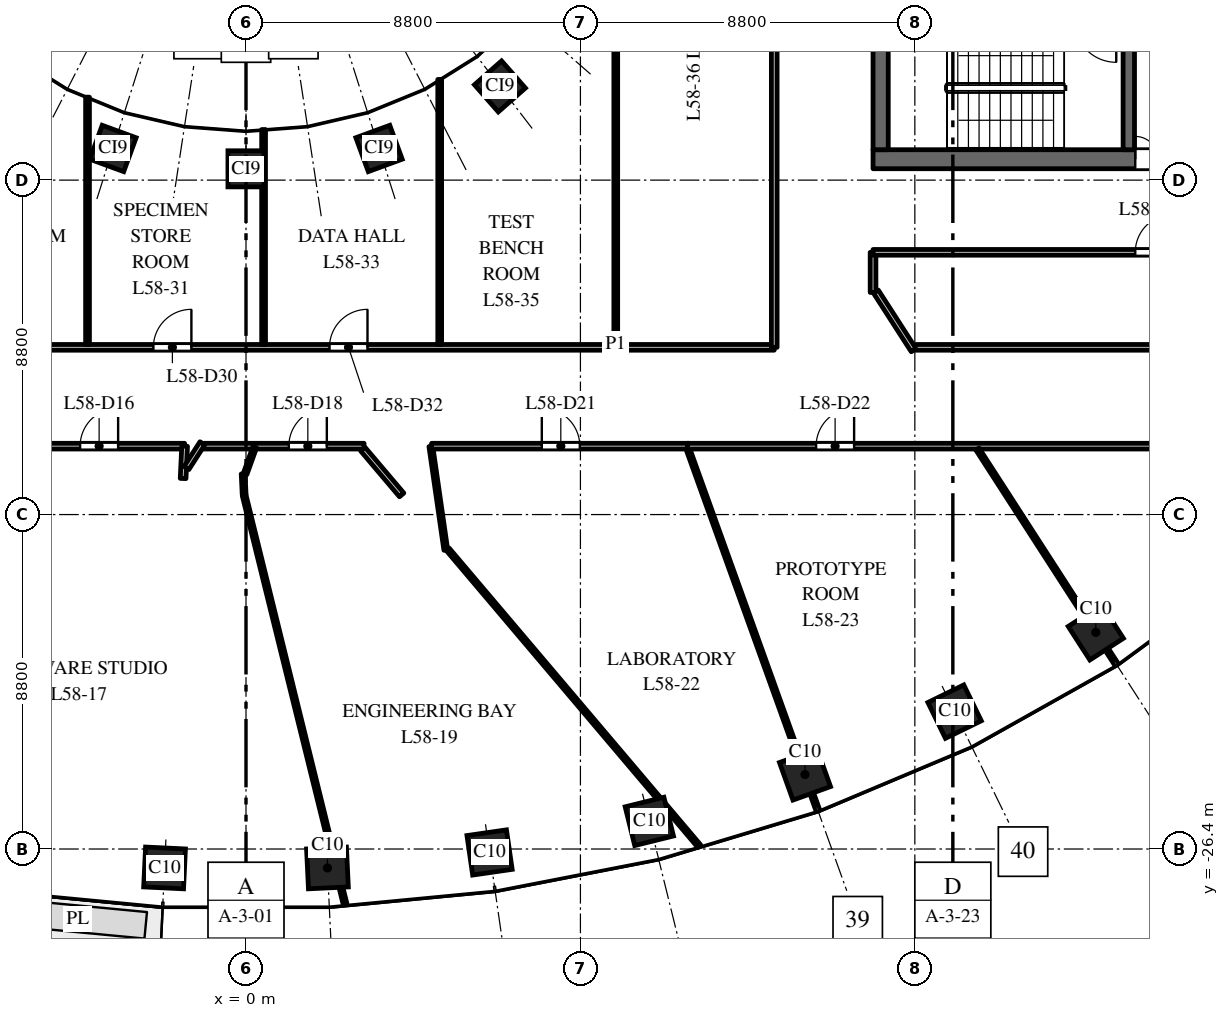
"""IFC4 building model, lengths in metres.
Left out: names, types, materials, properties, quantities, classifications, styles, units other than length and angle.
Written with IfcOpenShell. Run it as: python <this file> out.ifc"""

import sys

from ifc_helpers import new_model, si_unit, direction, frame, frame_2d, origin, origin_2d, place, context, subcontext, project, spatial, rectangle, extrude, element, fill, save


model = new_model("IFC4")
c1 = context("Model", 3, precision=1e-05, world=origin(), true_north=direction((0.0, 1.0)))
c2 = subcontext(c1, "Body", "Model", "MODEL_VIEW")
j1 = project(units=[si_unit("LENGTHUNIT", "METRE"), si_unit("PLANEANGLEUNIT", "RADIAN")], contexts=[c1])
p1 = place(None, origin())
s1 = spatial("IfcSite", under=j1, at=p1, CompositionType="ELEMENT")
p2 = place(p1, origin())
s2 = spatial("IfcBuilding", under=s1, at=p2, CompositionType="ELEMENT")
p3 = place(p2, frame((0.0, 0.0, 273.5)))
s3 = spatial("IfcBuildingStorey", under=s2, at=p3, CompositionType="ELEMENT", Elevation=273.5)
for number, where, z_axis, x_axis in (
    (1, (-2.143, -26.898, 0.0), (0.0, 0.0, 1.0), (0.999, -0.048, 0.0)),
    (2, (2.143, -26.898, 0.0), (0.0, 0.0, 1.0), (0.999, 0.048, 0.0)),
    (3, (6.409, -26.491, 0.0), (0.0, 0.0, 1.0), (0.99, 0.143, 0.0)),
    (4, (10.613, -25.674, 0.0), (0.0, 0.0, 1.0), (0.971, 0.24, 0.0)),
    (5, (14.709, -24.441, 0.0), (0.0, 0.0, 1.0), (0.941, 0.338, 0.0)),
    (6, (18.646, -22.785, 0.0), (0.0, 0.0, 1.0), (0.898, 0.439, 0.0)),
    (7, (22.362, -20.7, 0.0), (0.0, 0.0, 1.0), (0.84, 0.542, 0.0)),
):
    element("IfcColumn", number, at=place(p3, frame(where, z_axis=z_axis, x_axis=x_axis)), inside=s3, PredefinedType="COLUMN", context=c2, shape_type="SweptSolid", body=[
        extrude(rectangle(XDim=1.05, YDim=1.05, at=origin_2d()), origin(), (0.0, 0.0, 1.0), 4.0),
    ])
for number, where, z_axis, x_axis in (
    (8, (-3.501, -7.967, 0.0), (0.0, 0.0, 1.0), (0.939, -0.344, 0.0)),
    (9, (0.0, -8.503, 0.0), (0.0, 0.0, 1.0), (1.0, 0.0, 0.0)),
    (10, (3.501, -7.967, 0.0), (0.0, 0.0, 1.0), (0.939, 0.344, 0.0)),
    (11, (6.682, -6.334, 0.0), (0.0, 0.0, 1.0), (0.751, 0.66, 0.0)),
):
    element("IfcColumn", number, at=place(p3, frame(where, z_axis=z_axis, x_axis=x_axis)), inside=s3, PredefinedType="COLUMN", context=c2, shape_type="SweptSolid", body=[
        extrude(rectangle(XDim=0.95, YDim=0.95, at=origin_2d()), origin(), (0.0, 0.0, 1.0), 4.0),
    ])
p4 = place(p3, frame((16.5, -8.25, 0.0), z_axis=(0.0, 0.0, 1.0), x_axis=(1.0, 0.0, 0.0)))
e12 = element("IfcWall", 12, at=p4, inside=s3, PredefinedType="SHEAR", context=c2, shape_type="SweptSolid", body=[
    extrude(rectangle(XDim=15.0, YDim=0.5, at=frame_2d((7.5, 0.0))), origin(), (0.0, 0.0, 1.0), 3.7),
])
p5 = place(p4, frame((6.9, 0.0, 0.0)))
e13 = element("IfcOpeningElement", 13, at=p5, cuts=e12, PredefinedType="OPENING", context=c2, shape_type="SweptSolid", body=[
    extrude(rectangle(XDim=1.2, YDim=2.1, at=frame_2d((0.6, 1.05))), frame((0.0, 0.26, 0.0), z_axis=(0.0, -1.0, 0.0), x_axis=(1.0, 0.0, 0.0)), (0.0, 0.0, 1.0), 0.52),
])
p6 = place(p4, frame((12.95, 0.0, 0.0)))
e14 = element("IfcOpeningElement", 14, at=p6, cuts=e12, PredefinedType="OPENING", context=c2, shape_type="SweptSolid", body=[
    extrude(rectangle(XDim=0.9, YDim=2.1, at=frame_2d((0.45, 1.05))), frame((0.0, 0.26, 0.0), z_axis=(0.0, -1.0, 0.0), x_axis=(1.0, 0.0, 0.0)), (0.0, 0.0, 1.0), 0.52),
])
p7 = place(p3, frame((16.7, -8.0, 0.0), z_axis=(0.0, 0.0, 1.0), x_axis=(0.0, 1.0, 0.0)))
e15 = element("IfcWall", 15, at=p7, inside=s3, PredefinedType="SHEAR", context=c2, shape_type="SweptSolid", body=[
    extrude(rectangle(XDim=16.0, YDim=0.4, at=frame_2d((8.0, 0.0))), origin(), (0.0, 0.0, 1.0), 3.7),
])
p8 = place(p3, frame((23.23, -8.0, 0.0), z_axis=(0.0, 0.0, 1.0), x_axis=(0.0, 1.0, 0.0)))
e16 = element("IfcWall", 16, at=p8, inside=s3, PredefinedType="SHEAR", context=c2, shape_type="SweptSolid", body=[
    extrude(rectangle(XDim=7.875, YDim=0.3, at=frame_2d((3.938, 0.0))), origin(), (0.0, 0.0, 1.0), 3.7),
])
p9 = place(p8, frame((5.15, 0.0, 0.0)))
e17 = element("IfcOpeningElement", 17, at=p9, cuts=e16, PredefinedType="OPENING", context=c2, shape_type="SweptSolid", body=[
    extrude(rectangle(XDim=1.1, YDim=2.1, at=frame_2d((0.55, 1.05))), frame((0.0, 0.16, 0.0), z_axis=(0.0, -1.0, 0.0), x_axis=(1.0, 0.0, 0.0)), (0.0, 0.0, 1.0), 0.32),
])
p10 = place(p3, frame((-13.9, -13.2, 0.0), z_axis=(0.0, 0.0, 1.0), x_axis=(1.0, 0.0, 0.0)))
e18 = element("IfcWall", 18, at=p10, inside=s3, PredefinedType="PARTITIONING", context=c2, shape_type="SweptSolid", body=[
    extrude(rectangle(XDim=27.8, YDim=0.15, at=frame_2d((13.9, 0.0))), origin(), (0.0, 0.0, 1.0), 2.85),
])
p11 = place(p10, frame((6.83, 0.0, 0.0)))
e19 = element("IfcOpeningElement", 19, at=p11, cuts=e18, PredefinedType="OPENING", context=c2, shape_type="SweptSolid", body=[
    extrude(rectangle(XDim=1.0, YDim=2.1, at=frame_2d((0.5, 1.05))), frame((0.0, 0.085, 0.0), z_axis=(0.0, -1.0, 0.0), x_axis=(1.0, 0.0, 0.0)), (0.0, 0.0, 1.0), 0.17),
])
p12 = place(p10, frame((11.463, 0.0, 0.0)))
e20 = element("IfcOpeningElement", 20, at=p12, cuts=e18, PredefinedType="OPENING", context=c2, shape_type="SweptSolid", body=[
    extrude(rectangle(XDim=1.0, YDim=2.1, at=frame_2d((0.5, 1.05))), frame((0.0, 0.085, 0.0), z_axis=(0.0, -1.0, 0.0), x_axis=(1.0, 0.0, 0.0)), (0.0, 0.0, 1.0), 0.17),
])
p13 = place(p10, frame((16.097, 0.0, 0.0)))
e21 = element("IfcOpeningElement", 21, at=p13, cuts=e18, PredefinedType="OPENING", context=c2, shape_type="SweptSolid", body=[
    extrude(rectangle(XDim=1.0, YDim=2.1, at=frame_2d((0.5, 1.05))), frame((0.0, 0.085, 0.0), z_axis=(0.0, -1.0, 0.0), x_axis=(1.0, 0.0, 0.0)), (0.0, 0.0, 1.0), 0.17),
])
p14 = place(p3, frame((-6.152, -15.8, 0.0), z_axis=(0.0, 0.0, 1.0), x_axis=(1.0, 0.0, 0.0)))
e22 = element("IfcWall", 22, at=p14, inside=s3, PredefinedType="PARTITIONING", context=c2, shape_type="SweptSolid", body=[
    extrude(rectangle(XDim=4.537, YDim=0.15, at=frame_2d((2.269, 0.0))), origin(), (0.0, 0.0, 1.0), 3.7),
])
p15 = place(p14, frame((1.787, 0.0, 0.0)))
e23 = element("IfcOpeningElement", 23, at=p15, cuts=e22, PredefinedType="OPENING", context=c2, shape_type="SweptSolid", body=[
    extrude(rectangle(XDim=1.0, YDim=2.1, at=frame_2d((0.5, 1.05))), frame((0.0, 0.085, 0.0), z_axis=(0.0, -1.0, 0.0), x_axis=(1.0, 0.0, 0.0)), (0.0, 0.0, 1.0), 0.17),
])
p16 = place(p3, frame((-4.17, -13.125, 0.0), z_axis=(0.0, 0.0, 1.0), x_axis=(0.0, 1.0, 0.0)))
e24 = element("IfcWall", 24, at=p16, inside=s3, PredefinedType="PARTITIONING", context=c2, shape_type="SweptSolid", body=[
    extrude(rectangle(XDim=6.508, YDim=0.1, at=frame_2d((3.254, 0.0))), origin(), (0.0, 0.0, 1.0), 2.85),
])
p17 = place(p3, frame((-1.655, -16.651, 0.0), z_axis=(0.0, 0.0, 1.0), x_axis=(0.047006803258, 0.998894569235, 0.0)))
e25 = element("IfcWall", 25, at=p17, inside=s3, PredefinedType="PARTITIONING", context=c2, shape_type="SweptSolid", body=[
    extrude(rectangle(XDim=0.852, YDim=0.15, at=frame_2d((0.426, 0.0))), origin(), (0.0, 0.0, 1.0), 3.7),
])
p18 = place(p3, frame((-1.567, -16.376, 0.0), z_axis=(0.0, 0.0, 1.0), x_axis=(0.541235735997, 0.840870904527, 0.0)))
e26 = element("IfcWall", 26, at=p18, inside=s3, PredefinedType="PARTITIONING", context=c2, shape_type="SweptSolid", body=[
    extrude(rectangle(XDim=0.774, YDim=0.15, at=frame_2d((0.387, 0.0))), origin(), (0.0, 0.0, 1.0), 2.85),
])
p19 = place(p3, frame((-1.107, -15.8, 0.0), z_axis=(0.0, 0.0, 1.0), x_axis=(1.0, 0.0, 0.0)))
e27 = element("IfcWall", 27, at=p19, inside=s3, PredefinedType="PARTITIONING", context=c2, shape_type="SweptSolid", body=[
    extrude(rectangle(XDim=4.214, YDim=0.15, at=frame_2d((2.107, 0.0))), origin(), (0.0, 0.0, 1.0), 3.7),
])
p20 = place(p19, frame((2.234, 0.0, 0.0)))
e28 = element("IfcOpeningElement", 28, at=p20, cuts=e27, PredefinedType="OPENING", context=c2, shape_type="SweptSolid", body=[
    extrude(rectangle(XDim=1.0, YDim=2.1, at=frame_2d((0.5, 1.05))), frame((0.0, 0.085, 0.0), z_axis=(0.0, -1.0, 0.0), x_axis=(1.0, 0.0, 0.0)), (0.0, 0.0, 1.0), 0.17),
])
p21 = place(p3, frame((-0.075, -16.528, 0.0), z_axis=(0.0, 0.0, 1.0), x_axis=(0.047184463658, -0.998886192912, 0.0)))
e29 = element("IfcWall", 29, at=p21, inside=s3, PredefinedType="PARTITIONING", context=c2, shape_type="SweptSolid", body=[
    extrude(rectangle(XDim=0.549, YDim=0.1, at=frame_2d((0.274, 0.0))), origin(), (0.0, 0.0, 1.0), 3.7),
])
p22 = place(p3, frame((-0.025, -16.535, 0.0), z_axis=(0.0, 0.0, 1.0), x_axis=(0.338627931753, 0.940920359986, 0.0)))
e30 = element("IfcWall", 30, at=p22, inside=s3, PredefinedType="PARTITIONING", context=c2, shape_type="SweptSolid", body=[
    extrude(rectangle(XDim=0.756, YDim=0.1, at=frame_2d((0.378, 0.0))), origin(), (0.0, 0.0, 1.0), 3.7),
])
p23 = place(p3, frame((-0.048, -17.097, 0.0), z_axis=(0.0, 0.0, 1.0), x_axis=(0.23971007337, -0.970844519336, 0.0)))
e31 = element("IfcWall", 31, at=p23, inside=s3, PredefinedType="PARTITIONING", context=c2, shape_type="SweptSolid", body=[
    extrude(rectangle(XDim=11.084, YDim=0.1, at=frame_2d((5.542, 0.0))), origin(), (0.0, 0.0, 1.0), 3.0),
])
p24 = place(p3, frame((0.463, -13.125, 0.0), z_axis=(0.0, 0.0, 1.0), x_axis=(0.0, 1.0, 0.0)))
e32 = element("IfcWall", 32, at=p24, inside=s3, PredefinedType="PARTITIONING", context=c2, shape_type="SweptSolid", body=[
    extrude(rectangle(XDim=5.656, YDim=0.1, at=frame_2d((2.828, 0.0))), origin(), (0.0, 0.0, 1.0), 3.0),
])
p25 = place(p3, frame((3.075, -15.878, 0.0), z_axis=(0.0, 0.0, 1.0), x_axis=(0.646427152644, -0.76297571149, 0.0)))
e33 = element("IfcWall", 33, at=p25, inside=s3, PredefinedType="PARTITIONING", context=c2, shape_type="SweptSolid", body=[
    extrude(rectangle(XDim=1.579, YDim=0.15, at=frame_2d((0.79, 0.0))), origin(), (0.0, 0.0, 1.0), 2.85),
])
p26 = place(p3, frame((4.864, -15.804, 0.0), z_axis=(0.0, 0.0, 1.0), x_axis=(0.142908722314, -0.989735872385, 0.0)))
e34 = element("IfcWall", 34, at=p26, inside=s3, PredefinedType="PARTITIONING", context=c2, shape_type="SweptSolid", body=[
    extrude(rectangle(XDim=2.757, YDim=0.1, at=frame_2d((1.379, 0.0))), origin(), (0.0, 0.0, 1.0), 3.7),
])
p27 = place(p3, frame((4.884, -15.8, 0.0), z_axis=(0.0, 0.0, 1.0), x_axis=(1.0, 0.0, 0.0)))
e35 = element("IfcWall", 35, at=p27, inside=s3, PredefinedType="PARTITIONING", context=c2, shape_type="SweptSolid", body=[
    extrude(rectangle(XDim=6.771, YDim=0.15, at=frame_2d((3.385, 0.0))), origin(), (0.0, 0.0, 1.0), 2.85),
])
p28 = place(p27, frame((2.9, 0.0, 0.0)))
e36 = element("IfcOpeningElement", 36, at=p28, cuts=e35, PredefinedType="OPENING", context=c2, shape_type="SweptSolid", body=[
    extrude(rectangle(XDim=1.0, YDim=2.1, at=frame_2d((0.5, 1.05))), frame((0.0, 0.085, 0.0), z_axis=(0.0, -1.0, 0.0), x_axis=(1.0, 0.0, 0.0)), (0.0, 0.0, 1.0), 0.17),
])
p29 = place(p3, frame((5.097, -13.125, 0.0), z_axis=(0.0, 0.0, 1.0), x_axis=(0.0, 1.0, 0.0)))
e37 = element("IfcWall", 37, at=p29, inside=s3, PredefinedType="PARTITIONING", context=c2, shape_type="SweptSolid", body=[
    extrude(rectangle(XDim=6.974, YDim=0.1, at=frame_2d((3.487, 0.0))), origin(), (0.0, 0.0, 1.0), 2.85),
])
p30 = place(p3, frame((5.306, -18.512, 0.0), z_axis=(0.0, 0.0, 1.0), x_axis=(0.646500054355, -0.762913939917, 0.0)))
e38 = element("IfcWall", 38, at=p30, inside=s3, PredefinedType="PARTITIONING", context=c2, shape_type="SweptSolid", body=[
    extrude(rectangle(XDim=10.239, YDim=0.1, at=frame_2d((5.119, 0.0))), origin(), (0.0, 0.0, 1.0), 3.0),
])
p31 = place(p3, frame((9.73, -13.125, 0.0), z_axis=(0.0, 0.0, 1.0), x_axis=(0.0, 1.0, 0.0)))
e39 = element("IfcWall", 39, at=p31, inside=s3, PredefinedType="PARTITIONING", context=c2, shape_type="SweptSolid", body=[
    extrude(rectangle(XDim=26.25, YDim=0.1, at=frame_2d((13.125, 0.0))), origin(), (0.0, 0.0, 1.0), 2.75),
])
p32 = place(p3, frame((11.629, -15.875, 0.0), z_axis=(0.0, 0.0, 1.0), x_axis=(0.338394316696, -0.94100440298, 0.0)))
e40 = element("IfcWall", 40, at=p32, inside=s3, PredefinedType="PARTITIONING", context=c2, shape_type="SweptSolid", body=[
    extrude(rectangle(XDim=10.104, YDim=0.1, at=frame_2d((5.052, 0.0))), origin(), (0.0, 0.0, 1.0), 2.85),
])
p33 = place(p3, frame((11.614, -15.8, 0.0), z_axis=(0.0, 0.0, 1.0), x_axis=(1.0, 0.0, 0.0)))
e41 = element("IfcWall", 41, at=p33, inside=s3, PredefinedType="PARTITIONING", context=c2, shape_type="SweptSolid", body=[
    extrude(rectangle(XDim=16.386, YDim=0.15, at=frame_2d((8.193, 0.0))), origin(), (0.0, 0.0, 1.0), 3.0),
])
p34 = place(p33, frame((3.388, 0.0, 0.0)))
e42 = element("IfcOpeningElement", 42, at=p34, cuts=e41, PredefinedType="OPENING", context=c2, shape_type="SweptSolid", body=[
    extrude(rectangle(XDim=1.0, YDim=2.1, at=frame_2d((0.5, 1.05))), frame((0.0, 0.085, 0.0), z_axis=(0.0, -1.0, 0.0), x_axis=(1.0, 0.0, 0.0)), (0.0, 0.0, 1.0), 0.17),
])
p35 = place(p3, frame((13.9, -13.2, 0.0), z_axis=(0.0, 0.0, 1.0), x_axis=(0.0, 1.0, 0.0)))
e43 = element("IfcWall", 43, at=p35, inside=s3, PredefinedType="PARTITIONING", context=c2, shape_type="SweptSolid", body=[
    extrude(rectangle(XDim=26.4, YDim=0.15, at=frame_2d((13.2, 0.0))), origin(), (0.0, 0.0, 1.0), 2.75),
])
p36 = place(p35, frame((12.75, 0.0, 0.0)))
e44 = element("IfcOpeningElement", 44, at=p36, cuts=e43, PredefinedType="OPENING", context=c2, shape_type="SweptSolid", body=[
    extrude(rectangle(XDim=1.0, YDim=2.1, at=frame_2d((0.5, 1.05))), frame((0.0, 0.085, 0.0), z_axis=(0.0, -1.0, 0.0), x_axis=(1.0, 0.0, 0.0)), (0.0, 0.0, 1.0), 0.17),
])
p37 = place(p3, frame((16.5, -11.755, 0.0), z_axis=(0.0, 0.0, 1.0), x_axis=(0.0, 1.0, 0.0)))
e45 = element("IfcWall", 45, at=p37, inside=s3, PredefinedType="PARTITIONING", context=c2, shape_type="SweptSolid", body=[
    extrude(rectangle(XDim=1.055, YDim=0.15, at=frame_2d((0.527, 0.0))), origin(), (0.0, 0.0, 1.0), 3.7),
])
p38 = place(p3, frame((16.575, -11.733, 0.0), z_axis=(0.0, 0.0, 1.0), x_axis=(0.541860116324, -0.840468687304, 0.0)))
e46 = element("IfcWall", 46, at=p38, inside=s3, PredefinedType="PARTITIONING", context=c2, shape_type="SweptSolid", body=[
    extrude(rectangle(XDim=1.835, YDim=0.15, at=frame_2d((0.917, 0.0))), origin(), (0.0, 0.0, 1.0), 3.7),
])
p39 = place(p3, frame((16.5, -10.7, 0.0), z_axis=(0.0, 0.0, 1.0), x_axis=(1.0, 0.0, 0.0)))
e47 = element("IfcWall", 47, at=p39, inside=s3, PredefinedType="PARTITIONING", context=c2, shape_type="SweptSolid", body=[
    extrude(rectangle(XDim=15.0, YDim=0.15, at=frame_2d((7.5, 0.0))), origin(), (0.0, 0.0, 1.0), 2.75),
])
p40 = place(p39, frame((6.9, 0.0, 0.0)))
e48 = element("IfcOpeningElement", 48, at=p40, cuts=e47, PredefinedType="OPENING", context=c2, shape_type="SweptSolid", body=[
    extrude(rectangle(XDim=1.0, YDim=2.1, at=frame_2d((0.5, 1.05))), frame((0.0, 0.085, 0.0), z_axis=(0.0, -1.0, 0.0), x_axis=(1.0, 0.0, 0.0)), (0.0, 0.0, 1.0), 0.17),
])
p41 = place(p3, frame((17.61, -13.2, 0.0), z_axis=(0.0, 0.0, 1.0), x_axis=(1.0, 0.0, 0.0)))
e49 = element("IfcWall", 49, at=p41, inside=s3, PredefinedType="PARTITIONING", context=c2, shape_type="SweptSolid", body=[
    extrude(rectangle(XDim=10.39, YDim=0.15, at=frame_2d((5.195, 0.0))), origin(), (0.0, 0.0, 1.0), 2.75),
])
p42 = place(p3, frame((19.248, -15.875, 0.0), z_axis=(0.0, 0.0, 1.0), x_axis=(0.542216737844, -0.840238662049, 0.0)))
e50 = element("IfcWall", 50, at=p42, inside=s3, PredefinedType="PARTITIONING", context=c2, shape_type="SweptSolid", body=[
    extrude(rectangle(XDim=6.744, YDim=0.1, at=frame_2d((3.372, 0.0))), origin(), (0.0, 0.0, 1.0), 3.7),
])
p43 = place(p5, origin())
e51 = element("IfcDoor", 51, at=p43, inside=s3, OperationType="DOUBLE_DOOR_DOUBLE_SWING", PredefinedType="DOOR", context=c2, shape_type="SweptSolid", body=[
    extrude(rectangle(XDim=1.2, YDim=2.1, at=frame_2d((0.6, 1.05))), frame((0.0, 0.025, 0.0), z_axis=(0.0, -1.0, 0.0), x_axis=(1.0, 0.0, 0.0)), (0.0, 0.0, 1.0), 0.05),
])
fill(e13, e51)
p44 = place(p15, origin())
e52 = element("IfcDoor", 52, at=p44, inside=s3, OperationType="SINGLE_SWING_RIGHT", PredefinedType="DOOR", context=c2, shape_type="SweptSolid", body=[
    extrude(rectangle(XDim=1.0, YDim=2.1, at=frame_2d((0.5, 1.05))), frame((0.0, 0.025, 0.0), z_axis=(0.0, -1.0, 0.0), x_axis=(1.0, 0.0, 0.0)), (0.0, 0.0, 1.0), 0.05),
])
fill(e23, e52)
p45 = place(p20, origin())
e53 = element("IfcDoor", 53, at=p45, inside=s3, OperationType="SINGLE_SWING_RIGHT", PredefinedType="DOOR", context=c2, shape_type="SweptSolid", body=[
    extrude(rectangle(XDim=1.0, YDim=2.1, at=frame_2d((0.5, 1.05))), frame((0.0, 0.025, 0.0), z_axis=(0.0, -1.0, 0.0), x_axis=(1.0, 0.0, 0.0)), (0.0, 0.0, 1.0), 0.05),
])
fill(e28, e53)
p46 = place(p28, origin())
e54 = element("IfcDoor", 54, at=p46, inside=s3, OperationType="SINGLE_SWING_LEFT", PredefinedType="DOOR", context=c2, shape_type="SweptSolid", body=[
    extrude(rectangle(XDim=1.0, YDim=2.1, at=frame_2d((0.5, 1.05))), frame((0.0, 0.025, 0.0), z_axis=(0.0, -1.0, 0.0), x_axis=(1.0, 0.0, 0.0)), (0.0, 0.0, 1.0), 0.05),
])
fill(e36, e54)
p47 = place(p34, origin())
e55 = element("IfcDoor", 55, at=p47, inside=s3, OperationType="SINGLE_SWING_RIGHT", PredefinedType="DOOR", context=c2, shape_type="SweptSolid", body=[
    extrude(rectangle(XDim=1.0, YDim=2.1, at=frame_2d((0.5, 1.05))), frame((0.0, 0.025, 0.0), z_axis=(0.0, -1.0, 0.0), x_axis=(1.0, 0.0, 0.0)), (0.0, 0.0, 1.0), 0.05),
])
fill(e42, e55)
p48 = place(p40, origin())
e56 = element("IfcDoor", 56, at=p48, inside=s3, OperationType="SINGLE_SWING_RIGHT", PredefinedType="DOOR", context=c2, shape_type="SweptSolid", body=[
    extrude(rectangle(XDim=1.0, YDim=2.1, at=frame_2d((0.5, 1.05))), frame((0.0, 0.025, 0.0), z_axis=(0.0, -1.0, 0.0), x_axis=(1.0, 0.0, 0.0)), (0.0, 0.0, 1.0), 0.05),
])
fill(e48, e56)
p49 = place(p12, origin())
e57 = element("IfcDoor", 57, at=p49, inside=s3, OperationType="SINGLE_SWING_RIGHT", PredefinedType="DOOR", context=c2, shape_type="SweptSolid", body=[
    extrude(rectangle(XDim=1.0, YDim=2.1, at=frame_2d((0.5, 1.05))), frame((0.0, 0.025, 0.0), z_axis=(0.0, -1.0, 0.0), x_axis=(1.0, 0.0, 0.0)), (0.0, 0.0, 1.0), 0.05),
])
fill(e20, e57)
p50 = place(p13, origin())
e58 = element("IfcDoor", 58, at=p50, inside=s3, OperationType="SINGLE_SWING_RIGHT", PredefinedType="DOOR", context=c2, shape_type="SweptSolid", body=[
    extrude(rectangle(XDim=1.0, YDim=2.1, at=frame_2d((0.5, 1.05))), frame((0.0, 0.025, 0.0), z_axis=(0.0, -1.0, 0.0), x_axis=(1.0, 0.0, 0.0)), (0.0, 0.0, 1.0), 0.05),
])
fill(e21, e58)
save(model, sys.argv[1])
